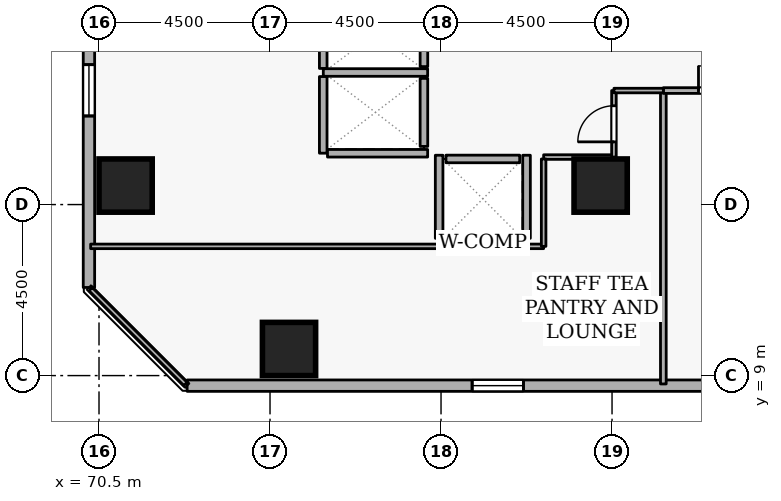
"""IFC4 building model, lengths in metres.
Left out: names, types, materials, properties, quantities, classifications, styles, units other than length and angle.
Written with IfcOpenShell. Run it as: python <this file> out.ifc"""

import sys

from ifc_helpers import new_model, si_unit, direction, frame, frame_2d, origin, origin_2d, place, context, subcontext, project, spatial, rectangle, extrude, element, fill, save


model = new_model("IFC4")
c1 = context("Model", 3, precision=1e-05, world=origin(), true_north=direction((0.0, 1.0)))
c2 = subcontext(c1, "Body", "Model", "MODEL_VIEW")
j1 = project(units=[si_unit("LENGTHUNIT", "METRE"), si_unit("PLANEANGLEUNIT", "RADIAN")], contexts=[c1])
p1 = place(None, origin())
s1 = spatial("IfcSite", under=j1, at=p1, CompositionType="ELEMENT")
p2 = place(p1, origin())
s2 = spatial("IfcBuilding", under=s1, at=p2, CompositionType="ELEMENT")
p3 = place(p2, frame((0.0, 0.0, 68.1)))
s3 = spatial("IfcBuildingStorey", under=s2, at=p3, CompositionType="ELEMENT", Elevation=68.1)
for number, where, z_axis, x_axis in (
    (1, (71.2, 14.0, 0.0), (0.0, 0.0, 1.0), (1.0, 0.0, 0.0)),
    (2, (75.5, 9.7, 0.0), (0.0, 0.0, 1.0), (1.0, 0.0, 0.0)),
    (3, (83.7, 14.0, 0.0), (0.0, 0.0, 1.0), (1.0, 0.0, 0.0)),
):
    element("IfcColumn", number, at=place(p3, frame(where, z_axis=z_axis, x_axis=x_axis)), inside=s3, PredefinedType="COLUMN", context=c2, shape_type="SweptSolid", body=[
        extrude(rectangle(XDim=1.4, YDim=1.4, at=origin_2d()), origin(), (0.0, 0.0, 1.0), 3.6),
    ])
p4 = place(p3, frame((72.819, 8.735, 0.0), z_axis=(0.0, 0.0, 1.0), x_axis=(1.0, 0.0, 0.0)))
e4 = element("IfcWall", 4, at=p4, inside=s3, PredefinedType="STANDARD", context=c2, shape_type="SweptSolid", body=[
    extrude(rectangle(XDim=37.362, YDim=0.3, at=frame_2d((18.681, 0.0))), origin(), (0.0, 0.0, 1.0), 2.66),
])
p5 = place(p4, frame((7.5, 0.0, 0.72)))
e5 = element("IfcOpeningElement", 5, at=p5, cuts=e4, PredefinedType="OPENING", context=c2, shape_type="SweptSolid", body=[
    extrude(rectangle(XDim=1.35, YDim=1.05, at=frame_2d((0.675, 0.525))), frame((0.0, 0.16, 0.0), z_axis=(0.0, -1.0, 0.0), x_axis=(1.0, 0.0, 0.0)), (0.0, 0.0, 1.0), 0.32),
])
p6 = place(p4, frame((17.1, 0.0, 0.72)))
e6 = element("IfcOpeningElement", 6, at=p6, cuts=e4, PredefinedType="OPENING", context=c2, shape_type="SweptSolid", body=[
    extrude(rectangle(XDim=1.35, YDim=1.05, at=frame_2d((0.675, 0.525))), frame((0.0, 0.16, 0.0), z_axis=(0.0, -1.0, 0.0), x_axis=(1.0, 0.0, 0.0)), (0.0, 0.0, 1.0), 0.32),
])
p7 = place(p4, frame((21.9, 0.0, 0.72)))
e7 = element("IfcOpeningElement", 7, at=p7, cuts=e4, PredefinedType="OPENING", context=c2, shape_type="SweptSolid", body=[
    extrude(rectangle(XDim=1.35, YDim=1.05, at=frame_2d((0.675, 0.525))), frame((0.0, 0.16, 0.0), z_axis=(0.0, -1.0, 0.0), x_axis=(1.0, 0.0, 0.0)), (0.0, 0.0, 1.0), 0.32),
])
p8 = place(p3, frame((70.235, 48.681, 0.0), z_axis=(0.0, 0.0, 1.0), x_axis=(0.0, -1.0, 0.0)))
e8 = element("IfcWall", 8, at=p8, inside=s3, PredefinedType="STANDARD", context=c2, shape_type="SweptSolid", body=[
    extrude(rectangle(XDim=37.362, YDim=0.3, at=frame_2d((18.681, 0.0))), origin(), (0.0, 0.0, 1.0), 2.66),
])
p9 = place(p8, frame((2.7, 0.0, 0.72)))
e9 = element("IfcOpeningElement", 9, at=p9, cuts=e8, PredefinedType="OPENING", context=c2, shape_type="SweptSolid", body=[
    extrude(rectangle(XDim=1.35, YDim=1.05, at=frame_2d((0.675, 0.525))), frame((0.0, 0.16, 0.0), z_axis=(0.0, -1.0, 0.0), x_axis=(1.0, 0.0, 0.0)), (0.0, 0.0, 1.0), 0.32),
])
p10 = place(p8, frame((12.3, 0.0, 0.72)))
e10 = element("IfcOpeningElement", 10, at=p10, cuts=e8, PredefinedType="OPENING", context=c2, shape_type="SweptSolid", body=[
    extrude(rectangle(XDim=1.35, YDim=1.05, at=frame_2d((0.675, 0.525))), frame((0.0, 0.16, 0.0), z_axis=(0.0, -1.0, 0.0), x_axis=(1.0, 0.0, 0.0)), (0.0, 0.0, 1.0), 0.32),
])
p11 = place(p8, frame((26.7, 0.0, 0.72)))
e11 = element("IfcOpeningElement", 11, at=p11, cuts=e8, PredefinedType="OPENING", context=c2, shape_type="SweptSolid", body=[
    extrude(rectangle(XDim=1.35, YDim=1.05, at=frame_2d((0.675, 0.525))), frame((0.0, 0.16, 0.0), z_axis=(0.0, -1.0, 0.0), x_axis=(1.0, 0.0, 0.0)), (0.0, 0.0, 1.0), 0.32),
])
p12 = place(p8, frame((31.5, 0.0, 0.72)))
e12 = element("IfcOpeningElement", 12, at=p12, cuts=e8, PredefinedType="OPENING", context=c2, shape_type="SweptSolid", body=[
    extrude(rectangle(XDim=1.35, YDim=1.05, at=frame_2d((0.675, 0.525))), frame((0.0, 0.16, 0.0), z_axis=(0.0, -1.0, 0.0), x_axis=(1.0, 0.0, 0.0)), (0.0, 0.0, 1.0), 0.32),
])
p13 = place(p3, frame((79.05, 17.13, 0.0), z_axis=(0.0, 0.0, 1.0), x_axis=(0.0, 1.0, 0.0)))
e13 = element("IfcWall", 13, at=p13, inside=s3, PredefinedType="STANDARD", context=c2, shape_type="SweptSolid", body=[
    extrude(rectangle(XDim=1.74, YDim=0.2, at=frame_2d((0.87, 0.0))), origin(), (0.0, 0.0, 1.0), 3.26),
])
p14 = place(p3, frame((79.05, 15.03, 0.0), z_axis=(0.0, 0.0, 1.0), x_axis=(0.0, 1.0, 0.0)))
e14 = element("IfcWall", 14, at=p14, inside=s3, PredefinedType="STANDARD", context=c2, shape_type="SweptSolid", body=[
    extrude(rectangle(XDim=1.79, YDim=0.2, at=frame_2d((0.895, 0.0))), origin(), (0.0, 0.0, 1.0), 3.26),
])
p15 = place(p3, frame((79.63, 14.7, 0.0), z_axis=(0.0, 0.0, 1.0), x_axis=(1.0, 0.0, 0.0)))
e15 = element("IfcWall", 15, at=p15, inside=s3, PredefinedType="STANDARD", context=c2, shape_type="SweptSolid", body=[
    extrude(rectangle(XDim=1.94, YDim=0.2, at=frame_2d((0.97, 0.0))), origin(), (0.0, 0.0, 1.0), 3.26),
])
p16 = place(p3, frame((76.402, 16.975, 0.0), z_axis=(0.0, 0.0, 1.0), x_axis=(1.0, 0.0, 0.0)))
e16 = element("IfcWall", 16, at=p16, inside=s3, PredefinedType="STANDARD", context=c2, shape_type="SweptSolid", body=[
    extrude(rectangle(XDim=2.746, YDim=0.2, at=frame_2d((1.373, 0.0))), origin(), (0.0, 0.0, 1.0), 3.26),
])
p17 = place(p3, frame((76.4, 14.852, 0.0), z_axis=(0.0, 0.0, 1.0), x_axis=(0.0, 1.0, 0.0)))
e17 = element("IfcWall", 17, at=p17, inside=s3, PredefinedType="STANDARD", context=c2, shape_type="SweptSolid", body=[
    extrude(rectangle(XDim=2.016, YDim=0.2, at=frame_2d((1.008, 0.0))), origin(), (0.0, 0.0, 1.0), 3.26),
])
p18 = place(p3, frame((76.4, 17.082, 0.0), z_axis=(0.0, 0.0, 1.0), x_axis=(0.0, 1.0, 0.0)))
e18 = element("IfcWall", 18, at=p18, inside=s3, PredefinedType="STANDARD", context=c2, shape_type="SweptSolid", body=[
    extrude(rectangle(XDim=1.856, YDim=0.2, at=frame_2d((0.928, 0.0))), origin(), (0.0, 0.0, 1.0), 3.26),
])
p19 = place(p3, frame((76.512, 14.85, 0.0), z_axis=(0.0, 0.0, 1.0), x_axis=(1.0, 0.0, 0.0)))
e19 = element("IfcWall", 19, at=p19, inside=s3, PredefinedType="STANDARD", context=c2, shape_type="SweptSolid", body=[
    extrude(rectangle(XDim=2.636, YDim=0.2, at=frame_2d((1.318, 0.0))), origin(), (0.0, 0.0, 1.0), 3.26),
])
p20 = place(p3, frame((79.452, 12.5, 0.0), z_axis=(0.0, 0.0, 1.0), x_axis=(1.0, 0.0, 0.0)))
e20 = element("IfcWall", 20, at=p20, inside=s3, PredefinedType="STANDARD", context=c2, shape_type="SweptSolid", body=[
    extrude(rectangle(XDim=2.296, YDim=0.2, at=frame_2d((1.148, 0.0))), origin(), (0.0, 0.0, 1.0), 3.26),
])
for number, where, z_axis, x_axis in (
    (21, (81.75, 12.612, 0.0), (0.0, 0.0, 1.0), (0.0, 1.0, 0.0)),
    (22, (79.45, 12.612, 0.0), (0.0, 0.0, 1.0), (0.0, 1.0, 0.0)),
):
    element("IfcWall", number, at=place(p3, frame(where, z_axis=z_axis, x_axis=x_axis)), inside=s3, PredefinedType="STANDARD", context=c2, shape_type="SweptSolid", body=[
        extrude(rectangle(XDim=2.186, YDim=0.2, at=frame_2d((1.093, 0.0))), origin(), (0.0, 0.0, 1.0), 3.26),
    ])
p21 = place(p3, frame((85.35, 8.78, 0.0), z_axis=(0.0, 0.0, 1.0), x_axis=(0.0, 1.0, 0.0)))
e23 = element("IfcWall", 23, at=p21, inside=s3, PredefinedType="PARTITIONING", context=c2, shape_type="SweptSolid", body=[
    extrude(rectangle(XDim=7.72, YDim=0.15, at=frame_2d((3.86, 0.0))), origin(), (0.0, 0.0, 1.0), 3.26),
])
p22 = place(p3, frame((85.35, 16.5, 0.0), z_axis=(0.0, 0.0, 1.0), x_axis=(1.0, 0.0, 0.0)))
e24 = element("IfcWall", 24, at=p22, inside=s3, PredefinedType="PARTITIONING", context=c2, shape_type="SweptSolid", body=[
    extrude(rectangle(XDim=3.15, YDim=0.15, at=frame_2d((1.575, 0.0))), origin(), (0.0, 0.0, 1.0), 3.26),
])
p23 = place(p22, frame((0.925, 0.0, 0.0)))
e25 = element("IfcOpeningElement", 25, at=p23, cuts=e24, PredefinedType="OPENING", context=c2, shape_type="SweptSolid", body=[
    extrude(rectangle(XDim=1.3, YDim=2.12, at=frame_2d((0.65, 1.06))), frame((0.0, 0.085, 0.0), z_axis=(0.0, -1.0, 0.0), x_axis=(1.0, 0.0, 0.0)), (0.0, 0.0, 1.0), 0.17),
])
p24 = place(p3, frame((82.2, 14.75, 0.0), z_axis=(0.0, 0.0, 1.0), x_axis=(1.0, 0.0, 0.0)))
e26 = element("IfcWall", 26, at=p24, inside=s3, PredefinedType="PARTITIONING", context=c2, shape_type="SweptSolid", body=[
    extrude(rectangle(XDim=1.85, YDim=0.12, at=frame_2d((0.925, 0.0))), origin(), (0.0, 0.0, 1.0), 3.26),
])
p25 = place(p3, frame((84.05, 14.75, 0.0), z_axis=(0.0, 0.0, 1.0), x_axis=(0.0, 1.0, 0.0)))
e27 = element("IfcWall", 27, at=p25, inside=s3, PredefinedType="PARTITIONING", context=c2, shape_type="SweptSolid", body=[
    extrude(rectangle(XDim=1.75, YDim=0.12, at=frame_2d((0.875, 0.0))), origin(), (0.0, 0.0, 1.0), 3.26),
])
p26 = place(p25, frame((0.4, 0.0, 0.0)))
e28 = element("IfcOpeningElement", 28, at=p26, cuts=e27, PredefinedType="OPENING", context=c2, shape_type="SweptSolid", body=[
    extrude(rectangle(XDim=0.95, YDim=2.1, at=frame_2d((0.475, 1.05))), frame((0.0, 0.07, 0.0), z_axis=(0.0, -1.0, 0.0), x_axis=(1.0, 0.0, 0.0)), (0.0, 0.0, 1.0), 0.14),
])
p27 = place(p3, frame((84.05, 16.5, 0.0), z_axis=(0.0, 0.0, 1.0), x_axis=(1.0, 0.0, 0.0)))
e29 = element("IfcWall", 29, at=p27, inside=s3, PredefinedType="PARTITIONING", context=c2, shape_type="SweptSolid", body=[
    extrude(rectangle(XDim=1.3, YDim=0.12, at=frame_2d((0.65, 0.0))), origin(), (0.0, 0.0, 1.0), 3.26),
])
p28 = place(p3, frame((72.775, 8.78, 0.0), z_axis=(0.0, 0.0, 1.0), x_axis=(-0.707106781187, 0.707106781187, 0.0)))
e30 = element("IfcWall", 30, at=p28, inside=s3, PredefinedType="PARTITIONING", context=c2, shape_type="SweptSolid", body=[
    extrude(rectangle(XDim=3.528, YDim=0.12, at=frame_2d((1.764, 0.0))), origin(), (0.0, 0.0, 1.0), 3.26),
])
p29 = place(p3, frame((70.28, 12.4, 0.0), z_axis=(0.0, 0.0, 1.0), x_axis=(1.0, 0.0, 0.0)))
e31 = element("IfcWall", 31, at=p29, inside=s3, PredefinedType="PARTITIONING", context=c2, shape_type="SweptSolid", body=[
    extrude(rectangle(XDim=9.172, YDim=0.12, at=frame_2d((4.586, 0.0))), origin(), (0.0, 0.0, 1.0), 3.26),
])
p30 = place(p3, frame((81.748, 12.4, 0.0), z_axis=(0.0, 0.0, 1.0), x_axis=(1.0, 0.0, 0.0)))
e32 = element("IfcWall", 32, at=p30, inside=s3, PredefinedType="PARTITIONING", context=c2, shape_type="SweptSolid", body=[
    extrude(rectangle(XDim=0.452, YDim=0.12, at=frame_2d((0.226, 0.0))), origin(), (0.0, 0.0, 1.0), 3.26),
])
p31 = place(p3, frame((82.2, 12.4, 0.0), z_axis=(0.0, 0.0, 1.0), x_axis=(0.0, 1.0, 0.0)))
e33 = element("IfcWall", 33, at=p31, inside=s3, PredefinedType="PARTITIONING", context=c2, shape_type="SweptSolid", body=[
    extrude(rectangle(XDim=2.3, YDim=0.12, at=frame_2d((1.15, 0.0))), origin(), (0.0, 0.0, 1.0), 3.26),
])
p32 = place(p5, origin())
e34 = element("IfcWindow", 34, at=p32, inside=s3, PartitioningType="SINGLE_PANEL", PredefinedType="WINDOW", context=c2, shape_type="SweptSolid", body=[
    extrude(rectangle(XDim=1.35, YDim=1.05, at=frame_2d((0.675, 0.525))), frame((0.0, 0.03, 0.0), z_axis=(0.0, -1.0, 0.0), x_axis=(1.0, 0.0, 0.0)), (0.0, 0.0, 1.0), 0.06),
])
fill(e5, e34)
p33 = place(p12, origin())
e35 = element("IfcWindow", 35, at=p33, inside=s3, PartitioningType="SINGLE_PANEL", PredefinedType="WINDOW", context=c2, shape_type="SweptSolid", body=[
    extrude(rectangle(XDim=1.35, YDim=1.05, at=frame_2d((0.675, 0.525))), frame((0.0, 0.03, 0.0), z_axis=(0.0, -1.0, 0.0), x_axis=(1.0, 0.0, 0.0)), (0.0, 0.0, 1.0), 0.06),
])
fill(e12, e35)
p34 = place(p23, origin())
e36 = element("IfcDoor", 36, at=p34, inside=s3, OperationType="DOUBLE_DOOR_SINGLE_SWING", PredefinedType="DOOR", context=c2, shape_type="SweptSolid", body=[
    extrude(rectangle(XDim=1.3, YDim=2.12, at=frame_2d((0.65, 1.06))), frame((0.0, 0.025, 0.0), z_axis=(0.0, -1.0, 0.0), x_axis=(1.0, 0.0, 0.0)), (0.0, 0.0, 1.0), 0.05),
])
fill(e25, e36)
p35 = place(p26, origin())
e37 = element("IfcDoor", 37, at=p35, inside=s3, OperationType="SINGLE_SWING_LEFT", PredefinedType="DOOR", context=c2, shape_type="SweptSolid", body=[
    extrude(rectangle(XDim=0.95, YDim=2.1, at=frame_2d((0.475, 1.05))), frame((0.0, 0.025, 0.0), z_axis=(0.0, -1.0, 0.0), x_axis=(1.0, 0.0, 0.0)), (0.0, 0.0, 1.0), 0.05),
])
fill(e28, e37)
save(model, sys.argv[1])
